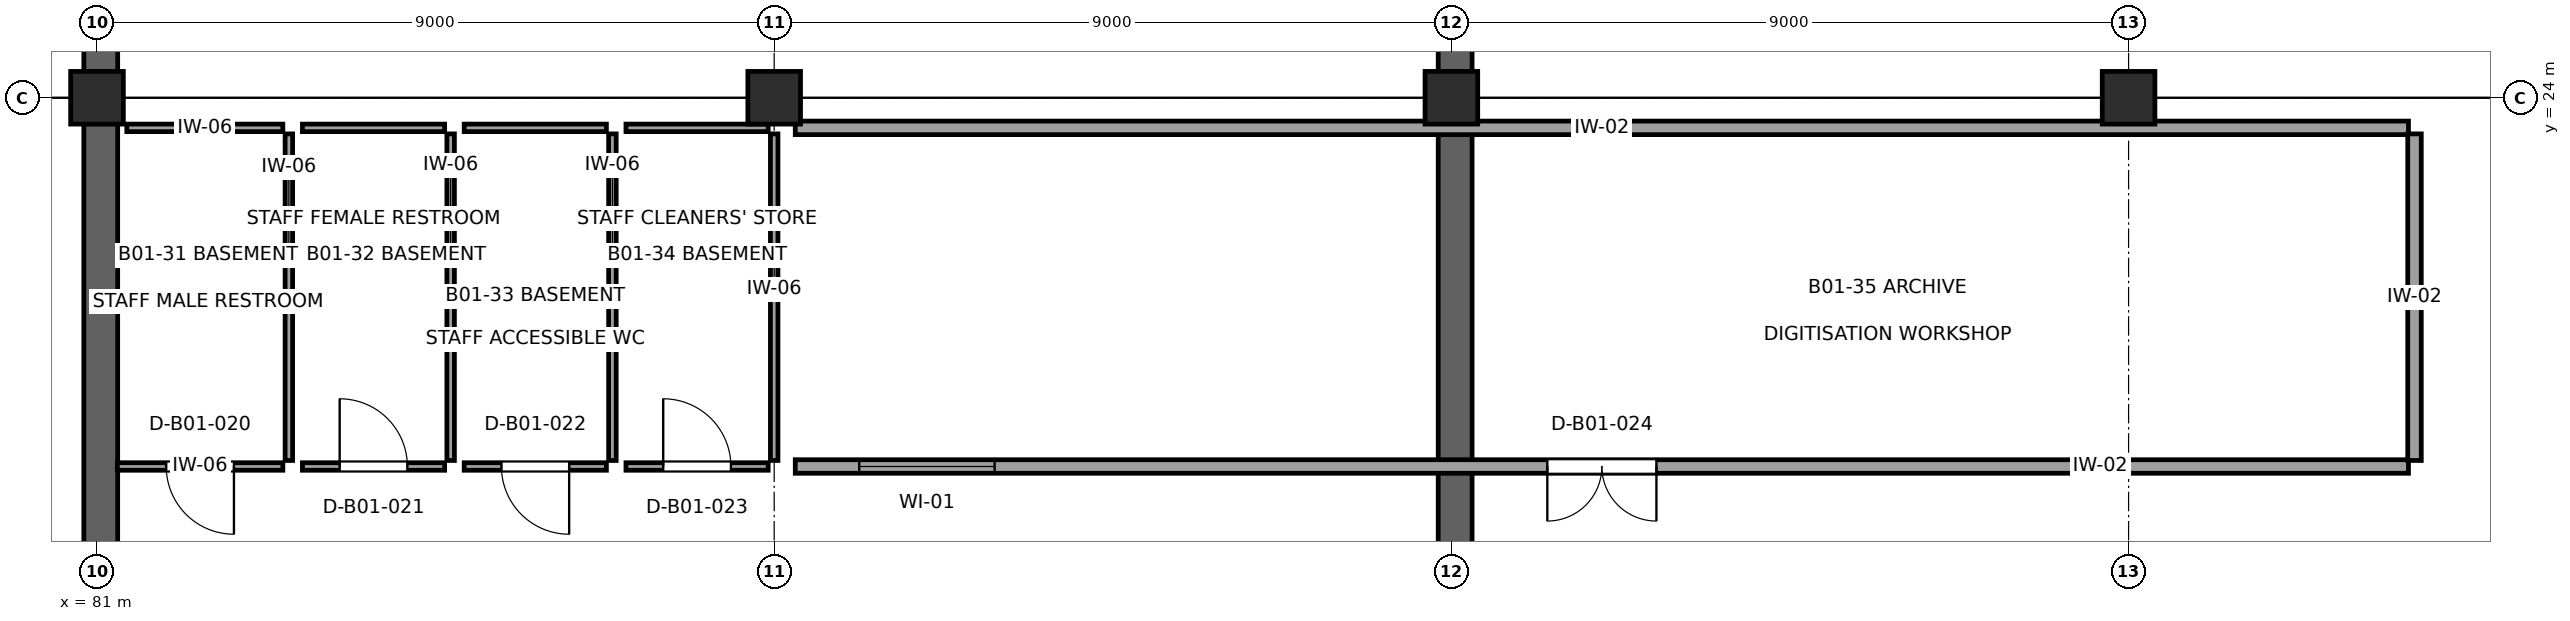
"""IFC4 building model, lengths in metres.
Left out: names, types, materials, properties, quantities, classifications, styles, units other than length and angle.
Written with IfcOpenShell. Run it as: python <this file> out.ifc"""

import sys

from ifc_helpers import new_model, si_unit, direction, frame, frame_2d, origin, origin_2d, place, context, subcontext, project, spatial, rectangle, extrude, element, fill, save


model = new_model("IFC4")
c1 = context("Model", 3, precision=1e-05, world=origin(), true_north=direction((0.0, 1.0)))
c2 = subcontext(c1, "Body", "Model", "MODEL_VIEW")
j1 = project(units=[si_unit("LENGTHUNIT", "METRE"), si_unit("PLANEANGLEUNIT", "RADIAN")], contexts=[c1])
p1 = place(None, origin())
s1 = spatial("IfcSite", under=j1, at=p1, CompositionType="ELEMENT")
p2 = place(p1, origin())
s2 = spatial("IfcBuilding", under=s1, at=p2, CompositionType="ELEMENT")
p3 = place(p2, frame((0.0, 0.0, -4.5)))
s3 = spatial("IfcBuildingStorey", under=s2, at=p3, CompositionType="ELEMENT", Elevation=-4.5)
for number, where, z_axis, x_axis in (
    (1, (81.0, 24.0, 0.0), (0.0, 0.0, 1.0), (1.0, 0.0, 0.0)),
    (2, (90.0, 24.0, 0.0), (0.0, 0.0, 1.0), (1.0, 0.0, 0.0)),
    (3, (99.0, 24.0, 0.0), (0.0, 0.0, 1.0), (1.0, 0.0, 0.0)),
    (4, (108.0, 24.0, 0.0), (0.0, 0.0, 1.0), (1.0, 0.0, 0.0)),
):
    element("IfcColumn", number, at=place(p3, frame(where, z_axis=z_axis, x_axis=x_axis)), inside=s3, PredefinedType="COLUMN", context=c2, shape_type="SweptSolid", body=[
        extrude(rectangle(XDim=0.7, YDim=0.7, at=origin_2d()), origin(), (0.0, 0.0, 1.0), 4.5),
    ])
p4 = place(p3, frame((99.05, 41.654, 0.0), z_axis=(0.0, 0.0, 1.0), x_axis=(0.0, -1.0, 0.0)))
e5 = element("IfcWall", 5, at=p4, inside=s3, PredefinedType="USERDEFINED", context=c2, shape_type="SweptSolid", body=[
    extrude(rectangle(XDim=17.308, YDim=0.45, at=frame_2d((8.654, 0.0))), origin(), (0.0, 0.0, 1.0), 4.32),
])
p5 = place(p3, frame((99.05, 23.654, 0.0), z_axis=(0.0, 0.0, 1.0), x_axis=(0.0, -1.0, 0.0)))
e6 = element("IfcWall", 6, at=p5, inside=s3, PredefinedType="USERDEFINED", context=c2, shape_type="SweptSolid", body=[
    extrude(rectangle(XDim=11.308, YDim=0.45, at=frame_2d((5.654, 0.0))), origin(), (0.0, 0.0, 1.0), 4.32),
])
p6 = place(p3, frame((81.05, 41.654, 0.0), z_axis=(0.0, 0.0, 1.0), x_axis=(0.0, -1.0, 0.0)))
e7 = element("IfcWall", 7, at=p6, inside=s3, PredefinedType="USERDEFINED", context=c2, shape_type="SweptSolid", body=[
    extrude(rectangle(XDim=17.308, YDim=0.45, at=frame_2d((8.654, 0.0))), origin(), (0.0, 0.0, 1.0), 4.32),
])
p7 = place(p3, frame((81.05, 23.654, 0.0), z_axis=(0.0, 0.0, 1.0), x_axis=(0.0, -1.0, 0.0)))
e8 = element("IfcWall", 8, at=p7, inside=s3, PredefinedType="USERDEFINED", context=c2, shape_type="SweptSolid", body=[
    extrude(rectangle(XDim=11.308, YDim=0.45, at=frame_2d((5.654, 0.0))), origin(), (0.0, 0.0, 1.0), 4.32),
])
p8 = place(p3, frame((83.47, 19.1, 0.0), z_axis=(0.0, 0.0, 1.0), x_axis=(-1.0, 0.0, 0.0)))
e9 = element("IfcWall", 9, at=p8, inside=s3, PredefinedType="PARTITIONING", context=c2, shape_type="SweptSolid", body=[
    extrude(rectangle(XDim=2.2, YDim=0.1, at=frame_2d((1.1, 0.0))), origin(), (0.0, 0.0, 1.0), 4.14),
])
p9 = place(p8, frame((0.65, 0.0, 0.0)))
e10 = element("IfcOpeningElement", 10, at=p9, cuts=e9, PredefinedType="OPENING", context=c2, shape_type="SweptSolid", body=[
    extrude(rectangle(XDim=0.9, YDim=2.05, at=frame_2d((0.45, 1.025))), frame((0.0, 0.065, 0.0), z_axis=(0.0, -1.0, 0.0), x_axis=(1.0, 0.0, 0.0)), (0.0, 0.0, 1.0), 0.13),
])
p10 = place(p3, frame((81.396, 23.6, 0.0), z_axis=(0.0, 0.0, 1.0), x_axis=(1.0, 0.0, 0.0)))
e11 = element("IfcWall", 11, at=p10, inside=s3, PredefinedType="PARTITIONING", context=c2, shape_type="SweptSolid", body=[
    extrude(rectangle(XDim=2.074, YDim=0.1, at=frame_2d((1.037, 0.0))), origin(), (0.0, 0.0, 1.0), 4.14),
])
p11 = place(p3, frame((83.55, 23.52, 0.0), z_axis=(0.0, 0.0, 1.0), x_axis=(0.0, -1.0, 0.0)))
e12 = element("IfcWall", 12, at=p11, inside=s3, PredefinedType="PARTITIONING", context=c2, shape_type="SweptSolid", body=[
    extrude(rectangle(XDim=4.34, YDim=0.1, at=frame_2d((2.17, 0.0))), origin(), (0.0, 0.0, 1.0), 4.14),
])
p12 = place(p3, frame((83.73, 23.6, 0.0), z_axis=(0.0, 0.0, 1.0), x_axis=(1.0, 0.0, 0.0)))
e13 = element("IfcWall", 13, at=p12, inside=s3, PredefinedType="PARTITIONING", context=c2, shape_type="SweptSolid", body=[
    extrude(rectangle(XDim=1.89, YDim=0.1, at=frame_2d((0.945, 0.0))), origin(), (0.0, 0.0, 1.0), 4.14),
])
p13 = place(p3, frame((85.7, 23.52, 0.0), z_axis=(0.0, 0.0, 1.0), x_axis=(0.0, -1.0, 0.0)))
e14 = element("IfcWall", 14, at=p13, inside=s3, PredefinedType="PARTITIONING", context=c2, shape_type="SweptSolid", body=[
    extrude(rectangle(XDim=4.34, YDim=0.1, at=frame_2d((2.17, 0.0))), origin(), (0.0, 0.0, 1.0), 4.14),
])
p14 = place(p3, frame((85.62, 19.1, 0.0), z_axis=(0.0, 0.0, 1.0), x_axis=(-1.0, 0.0, 0.0)))
e15 = element("IfcWall", 15, at=p14, inside=s3, PredefinedType="PARTITIONING", context=c2, shape_type="SweptSolid", body=[
    extrude(rectangle(XDim=1.89, YDim=0.1, at=frame_2d((0.945, 0.0))), origin(), (0.0, 0.0, 1.0), 4.14),
])
p15 = place(p14, frame((0.495, 0.0, 0.0)))
e16 = element("IfcOpeningElement", 16, at=p15, cuts=e15, PredefinedType="OPENING", context=c2, shape_type="SweptSolid", body=[
    extrude(rectangle(XDim=0.9, YDim=2.05, at=frame_2d((0.45, 1.025))), frame((0.0, 0.065, 0.0), z_axis=(0.0, -1.0, 0.0), x_axis=(1.0, 0.0, 0.0)), (0.0, 0.0, 1.0), 0.13),
])
p16 = place(p3, frame((85.88, 23.6, 0.0), z_axis=(0.0, 0.0, 1.0), x_axis=(1.0, 0.0, 0.0)))
e17 = element("IfcWall", 17, at=p16, inside=s3, PredefinedType="PARTITIONING", context=c2, shape_type="SweptSolid", body=[
    extrude(rectangle(XDim=1.89, YDim=0.1, at=frame_2d((0.945, 0.0))), origin(), (0.0, 0.0, 1.0), 4.14),
])
p17 = place(p3, frame((87.85, 23.52, 0.0), z_axis=(0.0, 0.0, 1.0), x_axis=(0.0, -1.0, 0.0)))
e18 = element("IfcWall", 18, at=p17, inside=s3, PredefinedType="PARTITIONING", context=c2, shape_type="SweptSolid", body=[
    extrude(rectangle(XDim=4.34, YDim=0.1, at=frame_2d((2.17, 0.0))), origin(), (0.0, 0.0, 1.0), 4.14),
])
p18 = place(p3, frame((87.77, 19.1, 0.0), z_axis=(0.0, 0.0, 1.0), x_axis=(-1.0, 0.0, 0.0)))
e19 = element("IfcWall", 19, at=p18, inside=s3, PredefinedType="PARTITIONING", context=c2, shape_type="SweptSolid", body=[
    extrude(rectangle(XDim=1.89, YDim=0.1, at=frame_2d((0.945, 0.0))), origin(), (0.0, 0.0, 1.0), 4.14),
])
p19 = place(p18, frame((0.495, 0.0, 0.0)))
e20 = element("IfcOpeningElement", 20, at=p19, cuts=e19, PredefinedType="OPENING", context=c2, shape_type="SweptSolid", body=[
    extrude(rectangle(XDim=0.9, YDim=2.1, at=frame_2d((0.45, 1.05))), frame((0.0, 0.065, 0.0), z_axis=(0.0, -1.0, 0.0), x_axis=(1.0, 0.0, 0.0)), (0.0, 0.0, 1.0), 0.13),
])
p20 = place(p3, frame((90.0, 23.52, 0.0), z_axis=(0.0, 0.0, 1.0), x_axis=(0.0, -1.0, 0.0)))
e21 = element("IfcWall", 21, at=p20, inside=s3, PredefinedType="PARTITIONING", context=c2, shape_type="SweptSolid", body=[
    extrude(rectangle(XDim=4.34, YDim=0.1, at=frame_2d((2.17, 0.0))), origin(), (0.0, 0.0, 1.0), 3.765),
])
p21 = place(p3, frame((89.92, 19.1, 0.0), z_axis=(0.0, 0.0, 1.0), x_axis=(-1.0, 0.0, 0.0)))
e22 = element("IfcWall", 22, at=p21, inside=s3, PredefinedType="PARTITIONING", context=c2, shape_type="SweptSolid", body=[
    extrude(rectangle(XDim=1.89, YDim=0.1, at=frame_2d((0.945, 0.0))), origin(), (0.0, 0.0, 1.0), 4.14),
])
p22 = place(p21, frame((0.495, 0.0, 0.0)))
e23 = element("IfcOpeningElement", 23, at=p22, cuts=e22, PredefinedType="OPENING", context=c2, shape_type="SweptSolid", body=[
    extrude(rectangle(XDim=0.9, YDim=2.05, at=frame_2d((0.45, 1.025))), frame((0.0, 0.065, 0.0), z_axis=(0.0, -1.0, 0.0), x_axis=(1.0, 0.0, 0.0)), (0.0, 0.0, 1.0), 0.13),
])
p23 = place(p3, frame((88.03, 23.6, 0.0), z_axis=(0.0, 0.0, 1.0), x_axis=(1.0, 0.0, 0.0)))
e24 = element("IfcWall", 24, at=p23, inside=s3, PredefinedType="PARTITIONING", context=c2, shape_type="SweptSolid", body=[
    extrude(rectangle(XDim=1.89, YDim=0.1, at=frame_2d((0.945, 0.0))), origin(), (0.0, 0.0, 1.0), 4.14),
])
p24 = place(p3, frame((111.72, 19.1, 0.0), z_axis=(0.0, 0.0, 1.0), x_axis=(-1.0, 0.0, 0.0)))
e25 = element("IfcWall", 25, at=p24, inside=s3, PredefinedType="PARTITIONING", context=c2, shape_type="SweptSolid", body=[
    extrude(rectangle(XDim=21.44, YDim=0.18, at=frame_2d((10.72, 0.0))), origin(), (0.0, 0.0, 1.0), 4.14),
])
p25 = place(p24, frame((9.995, 0.0, 0.0)))
e26 = element("IfcOpeningElement", 26, at=p25, cuts=e25, PredefinedType="OPENING", context=c2, shape_type="SweptSolid", body=[
    extrude(rectangle(XDim=1.45, YDim=2.3, at=frame_2d((0.725, 1.15))), frame((0.0, 0.105, 0.0), z_axis=(0.0, -1.0, 0.0), x_axis=(1.0, 0.0, 0.0)), (0.0, 0.0, 1.0), 0.21),
])
p26 = place(p24, frame((18.79, 0.0, 1.05)))
e27 = element("IfcOpeningElement", 27, at=p26, cuts=e25, PredefinedType="OPENING", context=c2, shape_type="SweptSolid", body=[
    extrude(rectangle(XDim=1.8, YDim=1.1, at=frame_2d((0.9, 0.55))), frame((0.0, 0.105, 0.0), z_axis=(0.0, -1.0, 0.0), x_axis=(1.0, 0.0, 0.0)), (0.0, 0.0, 1.0), 0.21),
])
p27 = place(p3, frame((90.28, 23.6, 0.0), z_axis=(0.0, 0.0, 1.0), x_axis=(1.0, 0.0, 0.0)))
e28 = element("IfcWall", 28, at=p27, inside=s3, PredefinedType="PARTITIONING", context=c2, shape_type="SweptSolid", body=[
    extrude(rectangle(XDim=21.44, YDim=0.18, at=frame_2d((10.72, 0.0))), origin(), (0.0, 0.0, 1.0), 4.14),
])
p28 = place(p3, frame((111.8, 23.52, 0.0), z_axis=(0.0, 0.0, 1.0), x_axis=(0.0, -1.0, 0.0)))
e29 = element("IfcWall", 29, at=p28, inside=s3, PredefinedType="PARTITIONING", context=c2, shape_type="SweptSolid", body=[
    extrude(rectangle(XDim=4.34, YDim=0.18, at=frame_2d((2.17, 0.0))), origin(), (0.0, 0.0, 1.0), 4.14),
])
p29 = place(p9, origin())
e30 = element("IfcDoor", 30, at=p29, inside=s3, OperationType="SINGLE_SWING_LEFT", PredefinedType="DOOR", context=c2, shape_type="SweptSolid", body=[
    extrude(rectangle(XDim=0.9, YDim=2.05, at=frame_2d((0.45, 1.025))), frame((0.0, 0.025, 0.0), z_axis=(0.0, -1.0, 0.0), x_axis=(1.0, 0.0, 0.0)), (0.0, 0.0, 1.0), 0.05),
])
fill(e10, e30)
p30 = place(p15, frame((0.9, 0.0, 0.0), z_axis=(0.0, 0.0, 1.0), x_axis=(-1.0, 0.0, 0.0)))
e31 = element("IfcDoor", 31, at=p30, inside=s3, OperationType="SINGLE_SWING_RIGHT", PredefinedType="DOOR", context=c2, shape_type="SweptSolid", body=[
    extrude(rectangle(XDim=0.9, YDim=2.05, at=frame_2d((0.45, 1.025))), frame((0.0, 0.025, 0.0), z_axis=(0.0, -1.0, 0.0), x_axis=(1.0, 0.0, 0.0)), (0.0, 0.0, 1.0), 0.05),
])
fill(e16, e31)
p31 = place(p19, origin())
e32 = element("IfcDoor", 32, at=p31, inside=s3, OperationType="SINGLE_SWING_LEFT", PredefinedType="DOOR", context=c2, shape_type="SweptSolid", body=[
    extrude(rectangle(XDim=0.9, YDim=2.1, at=frame_2d((0.45, 1.05))), frame((0.0, 0.025, 0.0), z_axis=(0.0, -1.0, 0.0), x_axis=(1.0, 0.0, 0.0)), (0.0, 0.0, 1.0), 0.05),
])
fill(e20, e32)
p32 = place(p22, frame((0.9, 0.0, 0.0), z_axis=(0.0, 0.0, 1.0), x_axis=(-1.0, 0.0, 0.0)))
e33 = element("IfcDoor", 33, at=p32, inside=s3, OperationType="SINGLE_SWING_RIGHT", PredefinedType="DOOR", context=c2, shape_type="SweptSolid", body=[
    extrude(rectangle(XDim=0.9, YDim=2.05, at=frame_2d((0.45, 1.025))), frame((0.0, 0.025, 0.0), z_axis=(0.0, -1.0, 0.0), x_axis=(1.0, 0.0, 0.0)), (0.0, 0.0, 1.0), 0.05),
])
fill(e23, e33)
p33 = place(p25, origin())
e34 = element("IfcDoor", 34, at=p33, inside=s3, OperationType="DOUBLE_DOOR_SINGLE_SWING", PredefinedType="DOOR", context=c2, shape_type="SweptSolid", body=[
    extrude(rectangle(XDim=1.45, YDim=2.3, at=frame_2d((0.725, 1.15))), frame((0.0, 0.025, 0.0), z_axis=(0.0, -1.0, 0.0), x_axis=(1.0, 0.0, 0.0)), (0.0, 0.0, 1.0), 0.05),
])
fill(e26, e34)
p34 = place(p26, origin())
e35 = element("IfcWindow", 35, at=p34, inside=s3, PartitioningType="SINGLE_PANEL", PredefinedType="WINDOW", context=c2, shape_type="SweptSolid", body=[
    extrude(rectangle(XDim=1.8, YDim=1.1, at=frame_2d((0.9, 0.55))), frame((0.0, 0.03, 0.0), z_axis=(0.0, -1.0, 0.0), x_axis=(1.0, 0.0, 0.0)), (0.0, 0.0, 1.0), 0.06),
])
fill(e27, e35)
save(model, sys.argv[1])
